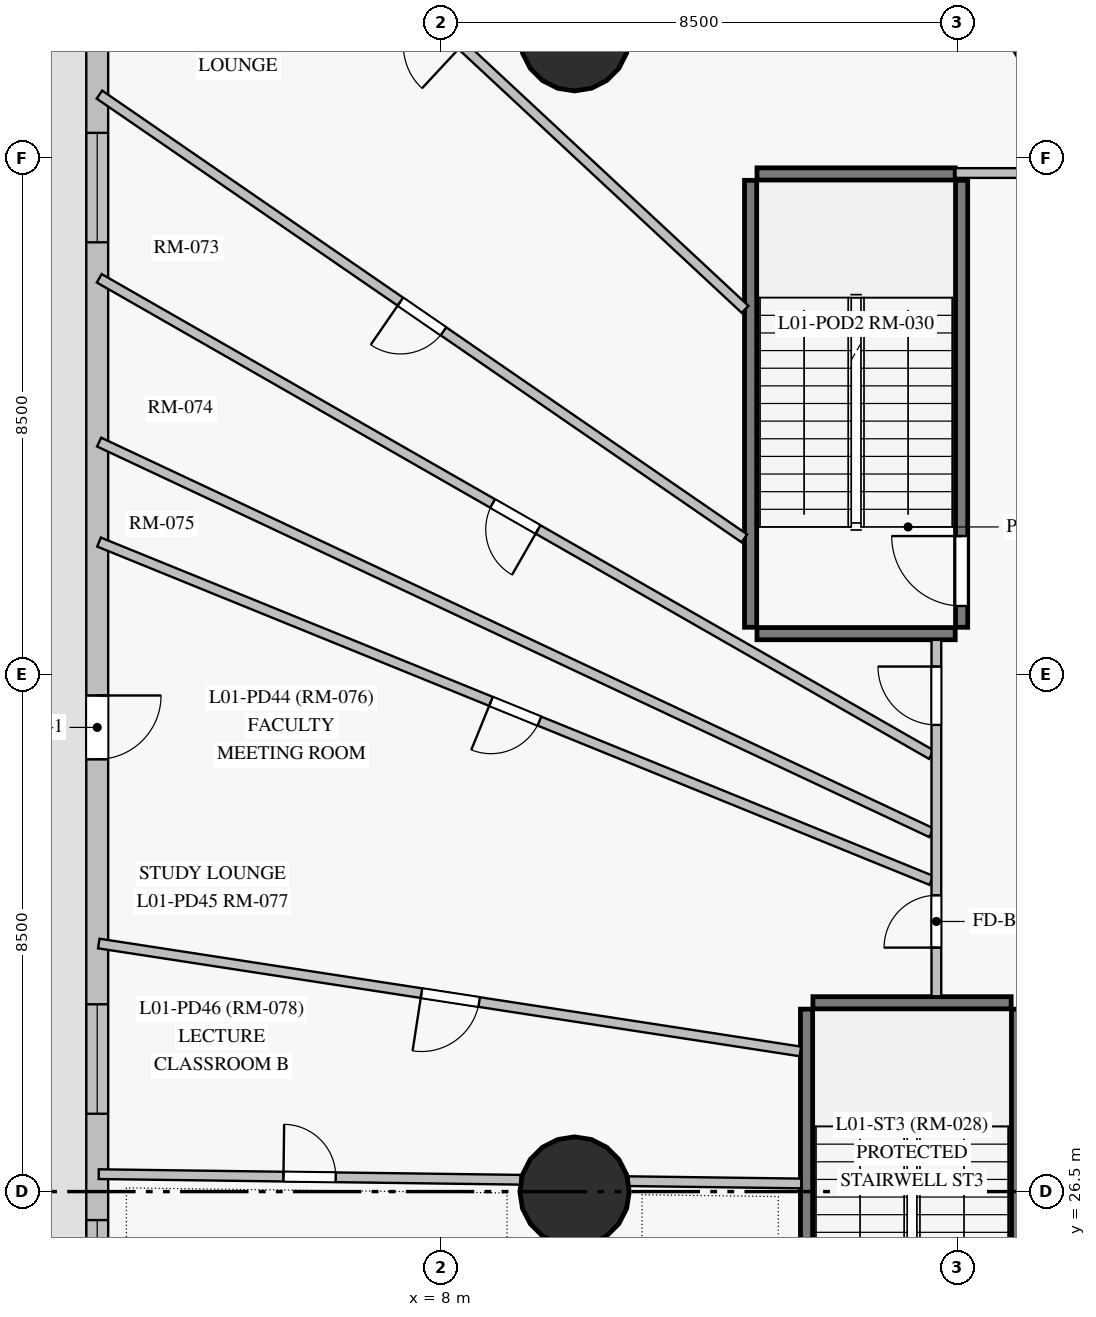
"""IFC4 building model, lengths in metres.
Left out: names, types, materials, properties, quantities, classifications, styles, units other than length and angle.
Written with IfcOpenShell. Run it as: python <this file> out.ifc"""

import sys

from ifc_helpers import new_model, si_unit, direction, frame, frame_2d, origin, origin_with_axes, origin_2d, place, context, subcontext, project, spatial, rectangle, circle, extrude, source, transform, mapped, element, fill, save


model = new_model("IFC4")
c1 = context("Model", 3, precision=1e-05, world=origin(), true_north=direction((0.0, 1.0)))
c2 = subcontext(c1, "Body", "Model", "MODEL_VIEW")
j1 = project(units=[si_unit("LENGTHUNIT", "METRE"), si_unit("PLANEANGLEUNIT", "RADIAN")], contexts=[c1])
p1 = place(None, origin())
s1 = spatial("IfcSite", under=j1, at=p1, CompositionType="ELEMENT")
p2 = place(p1, origin())
s2 = spatial("IfcBuilding", under=s1, at=p2, CompositionType="ELEMENT")
p3 = place(p2, frame((0.0, 0.0, 4.5)))
s3 = spatial("IfcBuildingStorey", under=s2, at=p3, CompositionType="ELEMENT", Elevation=4.5)
m1 = source(origin_with_axes(), c2, "Body", "SweptSolid", [
    extrude(circle(Radius=0.9, at=origin_2d()), origin(), (0.0, 0.0, 1.0), 4.5),
])
for number, where, z_axis, x_axis in (
    (1, (10.2, 26.5, 0.0), (0.0, 0.0, 1.0), (1.0, 0.0, 0.0)),
    (2, (10.2, 45.5, 0.0), (0.0, 0.0, 1.0), (1.0, 0.0, 0.0)),
):
    element("IfcColumn", number, at=place(p3, frame(where, z_axis=z_axis, x_axis=x_axis)), inside=s3, PredefinedType="COLUMN", context=c2, shape_type="MappedRepresentation", body=[
        mapped(m1, transform((0.0, 0.0, 0.0), scale=1.0)),
    ])
p4 = place(p3, frame((2.35, 49.4, 0.0), z_axis=(0.0, 0.0, 1.0), x_axis=(0.0, -1.0, 0.0)))
e3 = element("IfcWall", 3, at=p4, inside=s3, PredefinedType="SOLIDWALL", context=c2, shape_type="SweptSolid", body=[
    extrude(rectangle(XDim=45.8, YDim=0.36, at=frame_2d((22.9, 0.0))), origin(), (0.0, 0.0, 1.0), 4.2),
])
p5 = place(p4, frame((1.655, 0.0, 0.85)))
e4 = element("IfcOpeningElement", 4, at=p5, cuts=e3, PredefinedType="OPENING", context=c2, shape_type="SweptSolid", body=[
    extrude(rectangle(XDim=1.8, YDim=2.2, at=frame_2d((0.9, 1.1))), frame((0.0, 0.19, 0.0), z_axis=(0.0, -1.0, 0.0), x_axis=(1.0, 0.0, 0.0)), (0.0, 0.0, 1.0), 0.38),
])
p6 = place(p4, frame((5.489, 0.0, 0.85)))
e5 = element("IfcOpeningElement", 5, at=p6, cuts=e3, PredefinedType="OPENING", context=c2, shape_type="SweptSolid", body=[
    extrude(rectangle(XDim=1.8, YDim=2.2, at=frame_2d((0.9, 1.1))), frame((0.0, 0.19, 0.0), z_axis=(0.0, -1.0, 0.0), x_axis=(1.0, 0.0, 0.0)), (0.0, 0.0, 1.0), 0.38),
])
p7 = place(p4, frame((19.82, 0.0, 0.85)))
e6 = element("IfcOpeningElement", 6, at=p7, cuts=e3, PredefinedType="OPENING", context=c2, shape_type="SweptSolid", body=[
    extrude(rectangle(XDim=1.8, YDim=2.2, at=frame_2d((0.9, 1.1))), frame((0.0, 0.19, 0.0), z_axis=(0.0, -1.0, 0.0), x_axis=(1.0, 0.0, 0.0)), (0.0, 0.0, 1.0), 0.38),
])
p8 = place(p4, frame((23.368, 0.0, 0.85)))
e7 = element("IfcOpeningElement", 7, at=p8, cuts=e3, PredefinedType="OPENING", context=c2, shape_type="SweptSolid", body=[
    extrude(rectangle(XDim=1.8, YDim=2.2, at=frame_2d((0.9, 1.1))), frame((0.0, 0.19, 0.0), z_axis=(0.0, -1.0, 0.0), x_axis=(1.0, 0.0, 0.0)), (0.0, 0.0, 1.0), 0.38),
])
p9 = place(p4, frame((27.016, 0.0, 0.85)))
e8 = element("IfcOpeningElement", 8, at=p9, cuts=e3, PredefinedType="OPENING", context=c2, shape_type="SweptSolid", body=[
    extrude(rectangle(XDim=1.8, YDim=2.2, at=frame_2d((0.9, 1.1))), frame((0.0, 0.19, 0.0), z_axis=(0.0, -1.0, 0.0), x_axis=(1.0, 0.0, 0.0)), (0.0, 0.0, 1.0), 0.38),
])
p10 = place(p4, frame((32.039, 0.0, 0.85)))
e9 = element("IfcOpeningElement", 9, at=p10, cuts=e3, PredefinedType="OPENING", context=c2, shape_type="SweptSolid", body=[
    extrude(rectangle(XDim=1.8, YDim=2.2, at=frame_2d((0.9, 1.1))), frame((0.0, 0.19, 0.0), z_axis=(0.0, -1.0, 0.0), x_axis=(1.0, 0.0, 0.0)), (0.0, 0.0, 1.0), 0.38),
])
p11 = place(p4, frame((37.994, 0.0, 0.85)))
e10 = element("IfcOpeningElement", 10, at=p11, cuts=e3, PredefinedType="OPENING", context=c2, shape_type="SweptSolid", body=[
    extrude(rectangle(XDim=1.8, YDim=2.2, at=frame_2d((0.9, 1.1))), frame((0.0, 0.19, 0.0), z_axis=(0.0, -1.0, 0.0), x_axis=(1.0, 0.0, 0.0)), (0.0, 0.0, 1.0), 0.38),
])
p12 = place(p4, frame((42.795, 0.0, 0.85)))
e11 = element("IfcOpeningElement", 11, at=p12, cuts=e3, PredefinedType="OPENING", context=c2, shape_type="SweptSolid", body=[
    extrude(rectangle(XDim=1.8, YDim=2.2, at=frame_2d((0.9, 1.1))), frame((0.0, 0.19, 0.0), z_axis=(0.0, -1.0, 0.0), x_axis=(1.0, 0.0, 0.0)), (0.0, 0.0, 1.0), 0.38),
])
p13 = place(p4, frame((14.742, 0.0, 0.0)))
e12 = element("IfcOpeningElement", 12, at=p13, cuts=e3, PredefinedType="OPENING", context=c2, shape_type="SweptSolid", body=[
    extrude(rectangle(XDim=1.05, YDim=2.12, at=frame_2d((0.525, 1.06))), frame((0.0, 0.19, 0.0), z_axis=(0.0, -1.0, 0.0), x_axis=(1.0, 0.0, 0.0)), (0.0, 0.0, 1.0), 0.38),
])
p14 = place(p3, frame((14.015, 22.15, 0.0), z_axis=(0.0, 0.0, 1.0), x_axis=(0.0, 1.0, 0.0)))
e13 = element("IfcWall", 13, at=p14, inside=s3, PredefinedType="SHEAR", context=c2, shape_type="SweptSolid", body=[
    extrude(rectangle(XDim=7.35, YDim=0.2, at=frame_2d((3.675, 0.0))), origin(), (0.0, 0.0, 1.0), 4.2),
])
p15 = place(p3, frame((17.485, 22.15, 0.0), z_axis=(0.0, 0.0, 1.0), x_axis=(0.0, 1.0, 0.0)))
e14 = element("IfcWall", 14, at=p15, inside=s3, PredefinedType="SHEAR", context=c2, shape_type="SweptSolid", body=[
    extrude(rectangle(XDim=7.35, YDim=0.2, at=frame_2d((3.675, 0.0))), origin(), (0.0, 0.0, 1.0), 4.2),
])
p16 = place(p15, frame((0.35, 0.0, 0.0)))
e15 = element("IfcOpeningElement", 15, at=p16, cuts=e14, PredefinedType="OPENING", context=c2, shape_type="SweptSolid", body=[
    extrude(rectangle(XDim=1.15, YDim=2.15, at=frame_2d((0.575, 1.075))), frame((0.0, 0.11, 0.0), z_axis=(0.0, -1.0, 0.0), x_axis=(1.0, 0.0, 0.0)), (0.0, 0.0, 1.0), 0.22),
])
p17 = place(p3, frame((13.095, 35.78, 0.0), z_axis=(0.0, 0.0, 1.0), x_axis=(0.0, 1.0, 0.0)))
e16 = element("IfcWall", 16, at=p17, inside=s3, PredefinedType="SHEAR", context=c2, shape_type="SweptSolid", body=[
    extrude(rectangle(XDim=7.35, YDim=0.2, at=frame_2d((3.675, 0.0))), origin(), (0.0, 0.0, 1.0), 4.2),
])
p18 = place(p3, frame((16.565, 35.78, 0.0), z_axis=(0.0, 0.0, 1.0), x_axis=(0.0, 1.0, 0.0)))
e17 = element("IfcWall", 17, at=p18, inside=s3, PredefinedType="SHEAR", context=c2, shape_type="SweptSolid", body=[
    extrude(rectangle(XDim=7.35, YDim=0.2, at=frame_2d((3.675, 0.0))), origin(), (0.0, 0.0, 1.0), 4.2),
])
p19 = place(p18, frame((0.35, 0.0, 0.0)))
e18 = element("IfcOpeningElement", 18, at=p19, cuts=e17, PredefinedType="OPENING", context=c2, shape_type="SweptSolid", body=[
    extrude(rectangle(XDim=1.15, YDim=2.15, at=frame_2d((0.575, 1.075))), frame((0.0, 0.11, 0.0), z_axis=(0.0, -1.0, 0.0), x_axis=(1.0, 0.0, 0.0)), (0.0, 0.0, 1.0), 0.22),
])
for number, where, z_axis, x_axis in (
    (19, (13.2, 35.675, 0.0), (0.0, 0.0, 1.0), (1.0, 0.0, 0.0)),
    (20, (13.2, 43.235, 0.0), (0.0, 0.0, 1.0), (1.0, 0.0, 0.0)),
):
    element("IfcWall", number, at=place(p3, frame(where, z_axis=z_axis, x_axis=x_axis)), inside=s3, PredefinedType="SHEAR", context=c2, shape_type="SweptSolid", body=[
        extrude(rectangle(XDim=3.26, YDim=0.2, at=frame_2d((1.63, 0.0))), origin(), (0.0, 0.0, 1.0), 4.2),
    ])
p20 = place(p3, frame((14.12, 29.605, 0.0), z_axis=(0.0, 0.0, 1.0), x_axis=(1.0, 0.0, 0.0)))
e21 = element("IfcWall", 21, at=p20, inside=s3, PredefinedType="SHEAR", context=c2, shape_type="SweptSolid", body=[
    extrude(rectangle(XDim=3.26, YDim=0.2, at=frame_2d((1.63, 0.0))), origin(), (0.0, 0.0, 1.0), 4.2),
])
p21 = place(p3, frame((16.068, 33.686, 0.0), z_axis=(0.0, 0.0, 1.0), x_axis=(-0.867874159782, 0.496784100774, 0.0)))
e22 = element("IfcWall", 22, at=p21, inside=s3, PredefinedType="PARTITIONING", context=c2, shape_type="SweptSolid", body=[
    extrude(rectangle(XDim=15.768, YDim=0.16, at=frame_2d((7.884, 0.0))), origin(), (0.0, 0.0, 1.0), 4.2),
])
p22 = place(p21, frame((7.454, 0.0, 0.0)))
e23 = element("IfcOpeningElement", 23, at=p22, cuts=e22, PredefinedType="OPENING", context=c2, shape_type="SweptSolid", body=[
    extrude(rectangle(XDim=0.86, YDim=2.04, at=frame_2d((0.43, 1.02))), frame((0.0, 0.09, 0.0), z_axis=(0.0, -1.0, 0.0), x_axis=(1.0, 0.0, 0.0)), (0.0, 0.0, 1.0), 0.18),
])
p23 = place(p3, frame((16.068, 32.401, 0.0), z_axis=(0.0, 0.0, 1.0), x_axis=(-0.905248224799, 0.424883103334, 0.0)))
e24 = element("IfcWall", 24, at=p23, inside=s3, PredefinedType="PARTITIONING", context=c2, shape_type="SweptSolid", body=[
    extrude(rectangle(XDim=15.12, YDim=0.16, at=frame_2d((7.56, 0.0))), origin(), (0.0, 0.0, 1.0), 4.2),
])
p24 = place(p3, frame((16.068, 31.618, 0.0), z_axis=(0.0, 0.0, 1.0), x_axis=(-0.926404446812, 0.37652994692, 0.0)))
e25 = element("IfcWall", 25, at=p24, inside=s3, PredefinedType="PARTITIONING", context=c2, shape_type="SweptSolid", body=[
    extrude(rectangle(XDim=14.776, YDim=0.16, at=frame_2d((7.388, 0.0))), origin(), (0.0, 0.0, 1.0), 4.2),
])
p25 = place(p24, frame((6.958, 0.0, 0.0)))
e26 = element("IfcOpeningElement", 26, at=p25, cuts=e25, PredefinedType="OPENING", context=c2, shape_type="SweptSolid", body=[
    extrude(rectangle(XDim=0.86, YDim=2.04, at=frame_2d((0.43, 1.02))), frame((0.0, 0.09, 0.0), z_axis=(0.0, -1.0, 0.0), x_axis=(1.0, 0.0, 0.0)), (0.0, 0.0, 1.0), 0.18),
])
p26 = place(p3, frame((13.004, 41.009, 0.0), z_axis=(0.0, 0.0, 1.0), x_axis=(-0.731912390856, 0.681398746779, 0.0)))
e27 = element("IfcWall", 27, at=p26, inside=s3, PredefinedType="PARTITIONING", context=c2, shape_type="SweptSolid", body=[
    extrude(rectangle(XDim=13.451, YDim=0.16, at=frame_2d((6.725, 0.0))), origin(), (0.0, 0.0, 1.0), 4.2),
])
p27 = place(p26, frame((6.365, 0.0, 0.0)))
e28 = element("IfcOpeningElement", 28, at=p27, cuts=e27, PredefinedType="OPENING", context=c2, shape_type="SweptSolid", body=[
    extrude(rectangle(XDim=0.96, YDim=2.15, at=frame_2d((0.48, 1.075))), frame((0.0, 0.09, 0.0), z_axis=(0.0, -1.0, 0.0), x_axis=(1.0, 0.0, 0.0)), (0.0, 0.0, 1.0), 0.18),
])
p28 = place(p3, frame((12.993, 37.242, 0.0), z_axis=(0.0, 0.0, 1.0), x_axis=(-0.823836041433, 0.566828172232, 0.0)))
e29 = element("IfcWall", 29, at=p28, inside=s3, PredefinedType="PARTITIONING", context=c2, shape_type="SweptSolid", body=[
    extrude(rectangle(XDim=12.875, YDim=0.16, at=frame_2d((6.437, 0.0))), origin(), (0.0, 0.0, 1.0), 4.2),
])
p29 = place(p28, frame((6.007, 0.0, 0.0)))
e30 = element("IfcOpeningElement", 30, at=p29, cuts=e29, PredefinedType="OPENING", context=c2, shape_type="SweptSolid", body=[
    extrude(rectangle(XDim=0.86, YDim=2.04, at=frame_2d((0.43, 1.02))), frame((0.0, 0.09, 0.0), z_axis=(0.0, -1.0, 0.0), x_axis=(1.0, 0.0, 0.0)), (0.0, 0.0, 1.0), 0.18),
])
p30 = place(p3, frame((13.913, 28.805, 0.0), z_axis=(0.0, 0.0, 1.0), x_axis=(-0.988375807734, 0.15203046631, 0.0)))
e31 = element("IfcWall", 31, at=p30, inside=s3, PredefinedType="PARTITIONING", context=c2, shape_type="SweptSolid", body=[
    extrude(rectangle(XDim=11.673, YDim=0.16, at=frame_2d((5.836, 0.0))), origin(), (0.0, 0.0, 1.0), 4.2),
])
p31 = place(p30, frame((5.344, 0.0, 0.0)))
e32 = element("IfcOpeningElement", 32, at=p31, cuts=e31, PredefinedType="OPENING", context=c2, shape_type="SweptSolid", body=[
    extrude(rectangle(XDim=0.96, YDim=2.15, at=frame_2d((0.48, 1.075))), frame((0.0, 0.09, 0.0), z_axis=(0.0, -1.0, 0.0), x_axis=(1.0, 0.0, 0.0)), (0.0, 0.0, 1.0), 0.18),
])
p32 = place(p3, frame((21.125, 41.66, 0.0), z_axis=(0.0, 0.0, 1.0), x_axis=(-0.440663348881, 0.897672441903, 0.0)))
e33 = element("IfcWall", 33, at=p32, inside=s3, PredefinedType="PARTITIONING", context=c2, shape_type="SweptSolid", body=[
    extrude(rectangle(XDim=9.813, YDim=0.16, at=frame_2d((4.906, 0.0))), origin(), (0.0, 0.0, 1.0), 4.2),
])
p33 = place(p3, frame((18.646, 43.332, 0.0), z_axis=(0.0, 0.0, 1.0), x_axis=(-0.50787789651, 0.861429069765, 0.0)))
e34 = element("IfcWall", 34, at=p33, inside=s3, PredefinedType="PARTITIONING", context=c2, shape_type="SweptSolid", body=[
    extrude(rectangle(XDim=8.282, YDim=0.16, at=frame_2d((4.141, 0.0))), origin(), (0.0, 0.0, 1.0), 4.2),
])
p34 = place(p33, frame((3.711, 0.0, 0.0)))
e35 = element("IfcOpeningElement", 35, at=p34, cuts=e34, PredefinedType="OPENING", context=c2, shape_type="SweptSolid", body=[
    extrude(rectangle(XDim=0.86, YDim=2.04, at=frame_2d((0.43, 1.02))), frame((0.0, 0.09, 0.0), z_axis=(0.0, -1.0, 0.0), x_axis=(1.0, 0.0, 0.0)), (0.0, 0.0, 1.0), 0.18),
])
p35 = place(p3, frame((2.375, 26.787, 0.0), z_axis=(0.0, 0.0, 1.0), x_axis=(0.999911940712, -0.013270675267, 0.0)))
e36 = element("IfcWall", 36, at=p35, inside=s3, PredefinedType="PARTITIONING", context=c2, shape_type="SweptSolid", body=[
    extrude(rectangle(XDim=6.936, YDim=0.16, at=frame_2d((3.468, 0.0))), origin(), (0.0, 0.0, 1.0), 4.2),
])
p36 = place(p35, frame((3.038, 0.0, 0.0)))
e37 = element("IfcOpeningElement", 37, at=p36, cuts=e36, PredefinedType="OPENING", context=c2, shape_type="SweptSolid", body=[
    extrude(rectangle(XDim=0.86, YDim=2.04, at=frame_2d((0.43, 1.02))), frame((0.0, 0.09, 0.0), z_axis=(0.0, -1.0, 0.0), x_axis=(1.0, 0.0, 0.0)), (0.0, 0.0, 1.0), 0.18),
])
p37 = place(p3, frame((16.15, 29.712, 0.0), z_axis=(0.0, 0.0, 1.0), x_axis=(0.0, 1.0, 0.0)))
e38 = element("IfcWall", 38, at=p37, inside=s3, PredefinedType="PARTITIONING", context=c2, shape_type="SweptSolid", body=[
    extrude(rectangle(XDim=5.861, YDim=0.16, at=frame_2d((2.93, 0.0))), origin(), (0.0, 0.0, 1.0), 4.2),
])
p38 = place(p37, frame((4.462, 0.0, 0.0)))
e39 = element("IfcOpeningElement", 39, at=p38, cuts=e38, PredefinedType="OPENING", context=c2, shape_type="SweptSolid", body=[
    extrude(rectangle(XDim=0.96, YDim=2.15, at=frame_2d((0.48, 1.075))), frame((0.0, 0.09, 0.0), z_axis=(0.0, -1.0, 0.0), x_axis=(1.0, 0.0, 0.0)), (0.0, 0.0, 1.0), 0.18),
])
p39 = place(p37, frame((0.8, 0.0, 0.0)))
e40 = element("IfcOpeningElement", 40, at=p39, cuts=e38, PredefinedType="OPENING", context=c2, shape_type="SweptSolid", body=[
    extrude(rectangle(XDim=0.86, YDim=2.1, at=frame_2d((0.43, 1.05))), frame((0.0, 0.09, 0.0), z_axis=(0.0, -1.0, 0.0), x_axis=(1.0, 0.0, 0.0)), (0.0, 0.0, 1.0), 0.18),
])
p40 = place(p3, frame((11.09, 26.671, 0.0), z_axis=(0.0, 0.0, 1.0), x_axis=(0.999912250818, -0.013247288939, 0.0)))
e41 = element("IfcWall", 41, at=p40, inside=s3, PredefinedType="PARTITIONING", context=c2, shape_type="SweptSolid", body=[
    extrude(rectangle(XDim=2.838, YDim=0.16, at=frame_2d((1.419, 0.0))), origin(), (0.0, 0.0, 1.0), 3.25),
])
p41 = place(p3, frame((16.465, 43.25, 0.0), z_axis=(0.0, 0.0, 1.0), x_axis=(1.0, 0.0, 0.0)))
e42 = element("IfcWall", 42, at=p41, inside=s3, PredefinedType="PARTITIONING", context=c2, shape_type="SweptSolid", body=[
    extrude(rectangle(XDim=3.015, YDim=0.16, at=frame_2d((1.507, 0.0))), origin(), (0.0, 0.0, 1.0), 4.2),
])
m2 = source(origin_with_axes(), c2, "Body", "SweptSolid", [
    extrude(rectangle(XDim=1.8, YDim=2.2, at=frame_2d((0.9, 1.1))), frame((0.0, 0.03, 0.0), z_axis=(0.0, -1.0, 0.0), x_axis=(1.0, 0.0, 0.0)), (0.0, 0.0, 1.0), 0.06),
])
p42 = place(p6, origin())
e43 = element("IfcWindow", 43, at=p42, inside=s3, PartitioningType="SINGLE_PANEL", PredefinedType="WINDOW", context=c2, shape_type="MappedRepresentation", body=[
    mapped(m2, transform((0.0, 0.0, 0.0), scale=1.0)),
])
fill(e5, e43)
p43 = place(p7, origin())
e44 = element("IfcWindow", 44, at=p43, inside=s3, PartitioningType="SINGLE_PANEL", PredefinedType="WINDOW", context=c2, shape_type="MappedRepresentation", body=[
    mapped(m2, transform((0.0, 0.0, 0.0), scale=1.0)),
])
fill(e6, e44)
p44 = place(p8, origin())
e45 = element("IfcWindow", 45, at=p44, inside=s3, PartitioningType="SINGLE_PANEL", PredefinedType="WINDOW", context=c2, shape_type="MappedRepresentation", body=[
    mapped(m2, transform((0.0, 0.0, 0.0), scale=1.0)),
])
fill(e7, e45)
m3 = source(origin_with_axes(), c2, "Body", "SweptSolid", [
    extrude(rectangle(XDim=1.05, YDim=2.12, at=frame_2d((0.525, 1.06))), frame((0.0, 0.025, 0.0), z_axis=(0.0, -1.0, 0.0), x_axis=(1.0, 0.0, 0.0)), (0.0, 0.0, 1.0), 0.05),
])
p45 = place(p13, origin())
e46 = element("IfcDoor", 46, at=p45, inside=s3, OperationType="SINGLE_SWING_LEFT", PredefinedType="DOOR", context=c2, shape_type="MappedRepresentation", body=[
    mapped(m3, transform((0.0, 0.0, 0.0), scale=1.0)),
])
fill(e12, e46)
m4 = source(origin_with_axes(), c2, "Body", "SweptSolid", [
    extrude(rectangle(XDim=1.15, YDim=2.15, at=frame_2d((0.575, 1.075))), frame((0.0, 0.025, 0.0), z_axis=(0.0, -1.0, 0.0), x_axis=(1.0, 0.0, 0.0)), (0.0, 0.0, 1.0), 0.05),
])
p46 = place(p19, origin())
e47 = element("IfcDoor", 47, at=p46, inside=s3, OperationType="SINGLE_SWING_RIGHT", PredefinedType="DOOR", context=c2, shape_type="MappedRepresentation", body=[
    mapped(m4, transform((0.0, 0.0, 0.0), scale=1.0)),
])
fill(e18, e47)
m5 = source(origin_with_axes(), c2, "Body", "SweptSolid", [
    extrude(rectangle(XDim=0.96, YDim=2.15, at=frame_2d((0.48, 1.075))), frame((0.0, 0.025, 0.0), z_axis=(0.0, -1.0, 0.0), x_axis=(1.0, 0.0, 0.0)), (0.0, 0.0, 1.0), 0.05),
])
p47 = place(p38, origin())
e48 = element("IfcDoor", 48, at=p47, inside=s3, OperationType="SINGLE_SWING_RIGHT", PredefinedType="DOOR", context=c2, shape_type="MappedRepresentation", body=[
    mapped(m5, transform((0.0, 0.0, 0.0), scale=1.0)),
])
fill(e39, e48)
m6 = source(origin_with_axes(), c2, "Body", "SweptSolid", [
    extrude(rectangle(XDim=0.86, YDim=2.1, at=frame_2d((0.43, 1.05))), frame((0.0, 0.025, 0.0), z_axis=(0.0, -1.0, 0.0), x_axis=(1.0, 0.0, 0.0)), (0.0, 0.0, 1.0), 0.05),
])
p48 = place(p39, origin())
e49 = element("IfcDoor", 49, at=p48, inside=s3, OperationType="SINGLE_SWING_LEFT", PredefinedType="DOOR", context=c2, shape_type="MappedRepresentation", body=[
    mapped(m6, transform((0.0, 0.0, 0.0), scale=1.0)),
])
fill(e40, e49)
p49 = place(p31, origin())
e50 = element("IfcDoor", 50, at=p49, inside=s3, OperationType="SINGLE_SWING_RIGHT", PredefinedType="DOOR", context=c2, shape_type="MappedRepresentation", body=[
    mapped(m5, transform((0.0, 0.0, 0.0), scale=1.0)),
])
fill(e32, e50)
m7 = source(origin_with_axes(), c2, "Body", "SweptSolid", [
    extrude(rectangle(XDim=0.86, YDim=2.04, at=frame_2d((0.43, 1.02))), frame((0.0, 0.025, 0.0), z_axis=(0.0, -1.0, 0.0), x_axis=(1.0, 0.0, 0.0)), (0.0, 0.0, 1.0), 0.05),
])
p50 = place(p29, origin())
e51 = element("IfcDoor", 51, at=p50, inside=s3, OperationType="SINGLE_SWING_RIGHT", PredefinedType="DOOR", context=c2, shape_type="MappedRepresentation", body=[
    mapped(m7, transform((0.0, 0.0, 0.0), scale=1.0)),
])
fill(e30, e51)
p51 = place(p22, origin())
e52 = element("IfcDoor", 52, at=p51, inside=s3, OperationType="SINGLE_SWING_LEFT", PredefinedType="DOOR", context=c2, shape_type="MappedRepresentation", body=[
    mapped(m7, transform((0.0, 0.0, 0.0), scale=1.0)),
])
fill(e23, e52)
p52 = place(p25, origin())
e53 = element("IfcDoor", 53, at=p52, inside=s3, OperationType="SINGLE_SWING_RIGHT", PredefinedType="DOOR", context=c2, shape_type="MappedRepresentation", body=[
    mapped(m7, transform((0.0, 0.0, 0.0), scale=1.0)),
])
fill(e26, e53)
p53 = place(p36, origin())
e54 = element("IfcDoor", 54, at=p53, inside=s3, OperationType="SINGLE_SWING_LEFT", PredefinedType="DOOR", context=c2, shape_type="MappedRepresentation", body=[
    mapped(m7, transform((0.0, 0.0, 0.0), scale=1.0)),
])
fill(e37, e54)
save(model, sys.argv[1])
